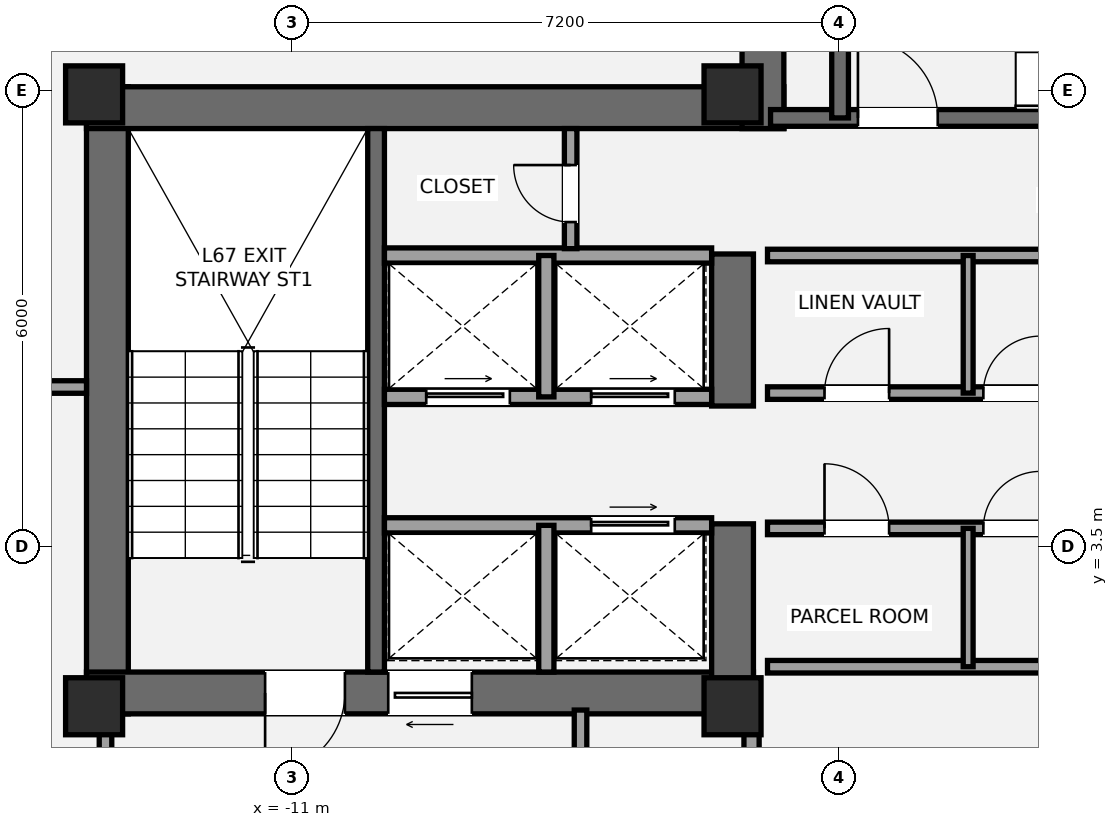
"""IFC4 building model, lengths in metres.
Left out: names, types, materials, properties, quantities, classifications, styles, units other than length and angle.
Written with IfcOpenShell. Run it as: python <this file> out.ifc"""

import sys

from ifc_helpers import new_model, si_unit, direction, frame, frame_2d, origin, origin_2d, place, context, subcontext, project, spatial, rectangle, extrude, element, fill, save


model = new_model("IFC4")
c1 = context("Model", 3, precision=1e-05, world=origin(), true_north=direction((0.0, 1.0)))
c2 = subcontext(c1, "Body", "Model", "MODEL_VIEW")
j1 = project(units=[si_unit("LENGTHUNIT", "METRE"), si_unit("PLANEANGLEUNIT", "RADIAN")], contexts=[c1])
p1 = place(None, origin())
s1 = spatial("IfcSite", under=j1, at=p1, CompositionType="ELEMENT")
p2 = place(p1, origin())
s2 = spatial("IfcBuilding", under=s1, at=p2, CompositionType="ELEMENT")
p3 = place(p2, frame((0.0, 0.0, 238.35)))
s3 = spatial("IfcBuildingStorey", under=s2, at=p3, CompositionType="ELEMENT", Elevation=238.35)
p4 = place(p3, frame((-13.425, 1.3, 0.0), z_axis=(0.0, 0.0, 1.0), x_axis=(0.0, 1.0, 0.0)))
e1 = element("IfcWall", 1, at=p4, inside=s3, PredefinedType="SHEAR", context=c2, shape_type="SweptSolid", body=[
    extrude(rectangle(XDim=8.25, YDim=0.55, at=frame_2d((4.125, 0.0))), origin(), (0.0, 0.0, 1.0), 3.15),
])
p5 = place(p3, frame((-13.7, 9.275, 0.0), z_axis=(0.0, 0.0, 1.0), x_axis=(1.0, 0.0, 0.0)))
e2 = element("IfcWall", 2, at=p5, inside=s3, PredefinedType="SHEAR", context=c2, shape_type="SweptSolid", body=[
    extrude(rectangle(XDim=9.175, YDim=0.55, at=frame_2d((4.587, 0.0))), origin(), (0.0, 0.0, 1.0), 3.15),
])
p6 = place(p3, frame((-4.925, 1.575, 0.0), z_axis=(0.0, 0.0, 1.0), x_axis=(-1.0, 0.0, 0.0)))
e3 = element("IfcWall", 3, at=p6, inside=s3, PredefinedType="SHEAR", context=c2, shape_type="SweptSolid", body=[
    extrude(rectangle(XDim=8.775, YDim=0.55, at=frame_2d((4.387, 0.0))), origin(), (0.0, 0.0, 1.0), 3.15),
])
p7 = place(p6, frame((5.375, 0.0, 0.0)))
e4 = element("IfcOpeningElement", 4, at=p7, cuts=e3, PredefinedType="OPENING", context=c2, shape_type="SweptSolid", body=[
    extrude(rectangle(XDim=1.05, YDim=2.15, at=frame_2d((0.525, 1.075))), frame((0.0, 0.285, 0.0), z_axis=(0.0, -1.0, 0.0), x_axis=(1.0, 0.0, 0.0)), (0.0, 0.0, 1.0), 0.57),
])
p8 = place(p6, frame((3.705, 0.0, 0.0)))
e5 = element("IfcOpeningElement", 5, at=p8, cuts=e3, PredefinedType="OPENING", context=c2, shape_type="SweptSolid", body=[
    extrude(rectangle(XDim=1.1, YDim=2.2, at=frame_2d((0.55, 1.1))), frame((0.0, 0.285, 0.0), z_axis=(0.0, -1.0, 0.0), x_axis=(1.0, 0.0, 0.0)), (0.0, 0.0, 1.0), 0.57),
])
p9 = place(p3, frame((-5.2, 1.3, 0.0), z_axis=(0.0, 0.0, 1.0), x_axis=(0.0, 1.0, 0.0)))
e6 = element("IfcWall", 6, at=p9, inside=s3, PredefinedType="SHEAR", context=c2, shape_type="SweptSolid", body=[
    extrude(rectangle(XDim=2.5, YDim=0.55, at=frame_2d((1.25, 0.0))), origin(), (0.0, 0.0, 1.0), 3.15),
])
p10 = place(p3, frame((-5.2, 5.35, 0.0), z_axis=(0.0, 0.0, 1.0), x_axis=(0.0, 1.0, 0.0)))
e7 = element("IfcWall", 7, at=p10, inside=s3, PredefinedType="SHEAR", context=c2, shape_type="SweptSolid", body=[
    extrude(rectangle(XDim=2.0, YDim=0.55, at=frame_2d((1.0, 0.0))), origin(), (0.0, 0.0, 1.0), 3.15),
])
p11 = place(p3, frame((-9.89, 1.85, 0.0), z_axis=(0.0, 0.0, 1.0), x_axis=(0.0, 1.0, 0.0)))
e8 = element("IfcWall", 8, at=p11, inside=s3, PredefinedType="SHEAR", context=c2, shape_type="SweptSolid", body=[
    extrude(rectangle(XDim=7.15, YDim=0.22, at=frame_2d((3.575, 0.0))), origin(), (0.0, 0.0, 1.0), 3.15),
])
p12 = place(p3, frame((-4.8, 9.0, 0.0), z_axis=(0.0, 0.0, 1.0), x_axis=(0.0, 1.0, 0.0)))
e9 = element("IfcWall", 9, at=p12, inside=s3, PredefinedType="SHEAR", context=c2, shape_type="SweptSolid", body=[
    extrude(rectangle(XDim=3.95, YDim=0.55, at=frame_2d((1.975, 0.0))), origin(), (0.0, 0.0, 1.0), 3.15),
])
p13 = place(p3, frame((-4.7, 9.14, 0.0), z_axis=(0.0, 0.0, 1.0), x_axis=(1.0, 0.0, 0.0)))
e10 = element("IfcWall", 10, at=p13, inside=s3, PredefinedType="SHEAR", context=c2, shape_type="SweptSolid", body=[
    extrude(rectangle(XDim=9.3, YDim=0.22, at=frame_2d((4.65, 0.0))), origin(), (0.0, 0.0, 1.0), 3.15),
])
p14 = place(p13, frame((1.15, 0.0, 0.0)))
e11 = element("IfcOpeningElement", 11, at=p14, cuts=e10, PredefinedType="OPENING", context=c2, shape_type="SweptSolid", body=[
    extrude(rectangle(XDim=1.05, YDim=2.15, at=frame_2d((0.525, 1.075))), frame((0.0, 0.12, 0.0), z_axis=(0.0, -1.0, 0.0), x_axis=(1.0, 0.0, 0.0)), (0.0, 0.0, 1.0), 0.24),
])
p15 = place(p3, frame((-3.785, 9.14, 0.0), z_axis=(0.0, 0.0, 1.0), x_axis=(0.0, 1.0, 0.0)))
e12 = element("IfcWall", 12, at=p15, inside=s3, PredefinedType="SHEAR", context=c2, shape_type="SweptSolid", body=[
    extrude(rectangle(XDim=3.26, YDim=0.22, at=frame_2d((1.63, 0.0))), origin(), (0.0, 0.0, 1.0), 3.15),
])
for number, where, z_axis, x_axis in (
    (13, (-13.6, 1.4, 0.0), (0.0, 0.0, 1.0), (1.0, 0.0, 0.0)),
    (14, (-13.6, 9.45, 0.0), (0.0, 0.0, 1.0), (1.0, 0.0, 0.0)),
    (15, (-5.2, 1.4, 0.0), (0.0, 0.0, 1.0), (1.0, 0.0, 0.0)),
    (16, (-5.2, 9.45, 0.0), (0.0, 0.0, 1.0), (1.0, 0.0, 0.0)),
):
    element("IfcColumn", number, at=place(p3, frame(where, z_axis=z_axis, x_axis=x_axis)), inside=s3, PredefinedType="PILASTER", context=c2, shape_type="SweptSolid", body=[
        extrude(rectangle(XDim=0.75, YDim=0.75, at=origin_2d()), origin(), (0.0, 0.0, 1.0), 3.15),
    ])
p16 = place(p3, frame((-17.381, 9.559, 0.0), z_axis=(0.0, 0.0, 1.0), x_axis=(0.827637036896, 0.561263694851, 0.0)))
e17 = element("IfcWall", 17, at=p16, inside=s3, PredefinedType="STANDARD", context=c2, shape_type="SweptSolid", body=[
    extrude(rectangle(XDim=3.793, YDim=0.44, at=frame_2d((1.896, 0.0))), origin(), (0.0, 0.0, 1.0), 2.336),
])
p17 = place(p16, frame((2.693, 0.0, 0.58)))
e18 = element("IfcOpeningElement", 18, at=p17, cuts=e17, PredefinedType="OPENING", context=c2, shape_type="SweptSolid", body=[
    extrude(rectangle(XDim=0.9, YDim=1.35, at=frame_2d((0.45, 0.675))), frame((0.0, 0.23, 0.0), z_axis=(0.0, -1.0, 0.0), x_axis=(1.0, 0.0, 0.0)), (0.0, 0.0, 1.0), 0.46),
])
p18 = place(p3, frame((-13.45, -2.15, 0.0), z_axis=(0.0, 0.0, 1.0), x_axis=(0.0, 1.0, 0.0)))
e19 = element("IfcWall", 19, at=p18, inside=s3, PredefinedType="PARTITIONING", context=c2, shape_type="SweptSolid", body=[
    extrude(rectangle(XDim=3.5, YDim=0.165, at=frame_2d((1.75, 0.0))), origin(), (0.0, 0.0, 1.0), 2.423),
])
p19 = place(p18, frame((0.67, 0.0, 0.0)))
e20 = element("IfcOpeningElement", 20, at=p19, cuts=e19, PredefinedType="OPENING", context=c2, shape_type="SweptSolid", body=[
    extrude(rectangle(XDim=1.05, YDim=2.15, at=frame_2d((0.525, 1.075))), frame((0.0, 0.093, 0.0), z_axis=(0.0, -1.0, 0.0), x_axis=(1.0, 0.0, 0.0)), (0.0, 0.0, 1.0), 0.185),
])
p20 = place(p3, frame((-7.2, -2.15, 0.0), z_axis=(0.0, 0.0, 1.0), x_axis=(0.0, 1.0, 0.0)))
e21 = element("IfcWall", 21, at=p20, inside=s3, PredefinedType="PARTITIONING", context=c2, shape_type="SweptSolid", body=[
    extrude(rectangle(XDim=3.5, YDim=0.165, at=frame_2d((1.75, 0.0))), origin(), (0.0, 0.0, 1.0), 2.423),
])
p21 = place(p3, frame((-4.95, -2.15, 0.0), z_axis=(0.0, 0.0, 1.0), x_axis=(0.0, 1.0, 0.0)))
e22 = element("IfcWall", 22, at=p21, inside=s3, PredefinedType="SOLIDWALL", context=c2, shape_type="SweptSolid", body=[
    extrude(rectangle(XDim=3.5, YDim=0.2, at=frame_2d((1.75, 0.0))), origin(), (0.0, 0.0, 1.0), 2.423),
])
p22 = place(p21, frame((0.95, 0.0, 0.0)))
e23 = element("IfcOpeningElement", 23, at=p22, cuts=e22, PredefinedType="OPENING", context=c2, shape_type="SweptSolid", body=[
    extrude(rectangle(XDim=0.75, YDim=2.1, at=frame_2d((0.375, 1.05))), frame((0.0, 0.11, 0.0), z_axis=(0.0, -1.0, 0.0), x_axis=(1.0, 0.0, 0.0)), (0.0, 0.0, 1.0), 0.22),
])
p23 = place(p3, frame((-9.78, 3.78, 0.0), z_axis=(0.0, 0.0, 1.0), x_axis=(1.0, 0.0, 0.0)))
e24 = element("IfcWall", 24, at=p23, inside=s3, PredefinedType="SOLIDWALL", context=c2, shape_type="SweptSolid", body=[
    extrude(rectangle(XDim=4.305, YDim=0.2, at=frame_2d((2.152, 0.0))), origin(), (0.0, 0.0, 1.0), 2.97),
])
p24 = place(p23, frame((2.72, 0.0, 0.0)))
e25 = element("IfcOpeningElement", 25, at=p24, cuts=e24, PredefinedType="OPENING", context=c2, shape_type="SweptSolid", body=[
    extrude(rectangle(XDim=1.1, YDim=2.2, at=frame_2d((0.55, 1.1))), frame((0.0, 0.11, 0.0), z_axis=(0.0, -1.0, 0.0), x_axis=(1.0, 0.0, 0.0)), (0.0, 0.0, 1.0), 0.22),
])
p25 = place(p3, frame((-7.65, 1.85, 0.0), z_axis=(0.0, 0.0, 1.0), x_axis=(0.0, 1.0, 0.0)))
e26 = element("IfcWall", 26, at=p25, inside=s3, PredefinedType="SOLIDWALL", context=c2, shape_type="SweptSolid", body=[
    extrude(rectangle(XDim=1.93, YDim=0.2, at=frame_2d((0.965, 0.0))), origin(), (0.0, 0.0, 1.0), 2.97),
])
p26 = place(p3, frame((-9.78, 5.47, 0.0), z_axis=(0.0, 0.0, 1.0), x_axis=(1.0, 0.0, 0.0)))
e27 = element("IfcWall", 27, at=p26, inside=s3, PredefinedType="SOLIDWALL", context=c2, shape_type="SweptSolid", body=[
    extrude(rectangle(XDim=4.305, YDim=0.2, at=frame_2d((2.152, 0.0))), origin(), (0.0, 0.0, 1.0), 2.97),
])
p27 = place(p26, frame((0.55, 0.0, 0.0)))
e28 = element("IfcOpeningElement", 28, at=p27, cuts=e27, PredefinedType="OPENING", context=c2, shape_type="SweptSolid", body=[
    extrude(rectangle(XDim=1.1, YDim=2.2, at=frame_2d((0.55, 1.1))), frame((0.0, 0.11, 0.0), z_axis=(0.0, -1.0, 0.0), x_axis=(1.0, 0.0, 0.0)), (0.0, 0.0, 1.0), 0.22),
])
p28 = place(p26, frame((2.72, 0.0, 0.0)))
e29 = element("IfcOpeningElement", 29, at=p28, cuts=e27, PredefinedType="OPENING", context=c2, shape_type="SweptSolid", body=[
    extrude(rectangle(XDim=1.1, YDim=2.2, at=frame_2d((0.55, 1.1))), frame((0.0, 0.11, 0.0), z_axis=(0.0, -1.0, 0.0), x_axis=(1.0, 0.0, 0.0)), (0.0, 0.0, 1.0), 0.22),
])
p29 = place(p3, frame((-9.78, 7.33, 0.0), z_axis=(0.0, 0.0, 1.0), x_axis=(1.0, 0.0, 0.0)))
e30 = element("IfcWall", 30, at=p29, inside=s3, PredefinedType="SOLIDWALL", context=c2, shape_type="SweptSolid", body=[
    extrude(rectangle(XDim=4.305, YDim=0.2, at=frame_2d((2.152, 0.0))), origin(), (0.0, 0.0, 1.0), 2.97),
])
p30 = place(p3, frame((-7.65, 5.47, 0.0), z_axis=(0.0, 0.0, 1.0), x_axis=(0.0, 1.0, 0.0)))
e31 = element("IfcWall", 31, at=p30, inside=s3, PredefinedType="SOLIDWALL", context=c2, shape_type="SweptSolid", body=[
    extrude(rectangle(XDim=1.86, YDim=0.2, at=frame_2d((0.93, 0.0))), origin(), (0.0, 0.0, 1.0), 2.97),
])
p31 = place(p3, frame((-4.74, 1.92, 0.0), z_axis=(0.0, 0.0, 1.0), x_axis=(1.0, 0.0, 0.0)))
e32 = element("IfcWall", 32, at=p31, inside=s3, PredefinedType="PARTITIONING", context=c2, shape_type="SweptSolid", body=[
    extrude(rectangle(XDim=3.89, YDim=0.165, at=frame_2d((1.945, 0.0))), origin(), (0.0, 0.0, 1.0), 2.11),
])
p32 = place(p3, frame((-4.74, 3.74, 0.0), z_axis=(0.0, 0.0, 1.0), x_axis=(1.0, 0.0, 0.0)))
e33 = element("IfcWall", 33, at=p32, inside=s3, PredefinedType="PARTITIONING", context=c2, shape_type="SweptSolid", body=[
    extrude(rectangle(XDim=3.89, YDim=0.165, at=frame_2d((1.945, 0.0))), origin(), (0.0, 0.0, 1.0), 2.97),
])
p33 = place(p32, frame((0.75, 0.0, 0.0)))
e34 = element("IfcOpeningElement", 34, at=p33, cuts=e33, PredefinedType="OPENING", context=c2, shape_type="SweptSolid", body=[
    extrude(rectangle(XDim=0.85, YDim=2.1, at=frame_2d((0.425, 1.05))), frame((0.0, 0.093, 0.0), z_axis=(0.0, -1.0, 0.0), x_axis=(1.0, 0.0, 0.0)), (0.0, 0.0, 1.0), 0.185),
])
p34 = place(p32, frame((2.84, 0.0, 0.0)))
e35 = element("IfcOpeningElement", 35, at=p34, cuts=e33, PredefinedType="OPENING", context=c2, shape_type="SweptSolid", body=[
    extrude(rectangle(XDim=0.75, YDim=2.1, at=frame_2d((0.375, 1.05))), frame((0.0, 0.093, 0.0), z_axis=(0.0, -1.0, 0.0), x_axis=(1.0, 0.0, 0.0)), (0.0, 0.0, 1.0), 0.185),
])
p35 = place(p3, frame((-2.1, 1.92, 0.0), z_axis=(0.0, 0.0, 1.0), x_axis=(0.0, 1.0, 0.0)))
e36 = element("IfcWall", 36, at=p35, inside=s3, PredefinedType="PARTITIONING", context=c2, shape_type="SweptSolid", body=[
    extrude(rectangle(XDim=1.82, YDim=0.13, at=frame_2d((0.91, 0.0))), origin(), (0.0, 0.0, 1.0), 2.97),
])
p36 = place(p3, frame((-4.74, 5.52, 0.0), z_axis=(0.0, 0.0, 1.0), x_axis=(1.0, 0.0, 0.0)))
e37 = element("IfcWall", 37, at=p36, inside=s3, PredefinedType="PARTITIONING", context=c2, shape_type="SweptSolid", body=[
    extrude(rectangle(XDim=3.89, YDim=0.165, at=frame_2d((1.945, 0.0))), origin(), (0.0, 0.0, 1.0), 2.97),
])
p37 = place(p36, frame((0.75, 0.0, 0.0)))
e38 = element("IfcOpeningElement", 38, at=p37, cuts=e37, PredefinedType="OPENING", context=c2, shape_type="SweptSolid", body=[
    extrude(rectangle(XDim=0.85, YDim=2.1, at=frame_2d((0.425, 1.05))), frame((0.0, 0.093, 0.0), z_axis=(0.0, -1.0, 0.0), x_axis=(1.0, 0.0, 0.0)), (0.0, 0.0, 1.0), 0.185),
])
p38 = place(p36, frame((2.84, 0.0, 0.0)))
e39 = element("IfcOpeningElement", 39, at=p38, cuts=e37, PredefinedType="OPENING", context=c2, shape_type="SweptSolid", body=[
    extrude(rectangle(XDim=0.75, YDim=2.1, at=frame_2d((0.375, 1.05))), frame((0.0, 0.093, 0.0), z_axis=(0.0, -1.0, 0.0), x_axis=(1.0, 0.0, 0.0)), (0.0, 0.0, 1.0), 0.185),
])
p39 = place(p3, frame((-4.74, 7.33, 0.0), z_axis=(0.0, 0.0, 1.0), x_axis=(1.0, 0.0, 0.0)))
e40 = element("IfcWall", 40, at=p39, inside=s3, PredefinedType="PARTITIONING", context=c2, shape_type="SweptSolid", body=[
    extrude(rectangle(XDim=3.89, YDim=0.165, at=frame_2d((1.945, 0.0))), origin(), (0.0, 0.0, 1.0), 2.97),
])
p40 = place(p3, frame((-2.1, 5.52, 0.0), z_axis=(0.0, 0.0, 1.0), x_axis=(0.0, 1.0, 0.0)))
e41 = element("IfcWall", 41, at=p40, inside=s3, PredefinedType="PARTITIONING", context=c2, shape_type="SweptSolid", body=[
    extrude(rectangle(XDim=1.81, YDim=0.13, at=frame_2d((0.905, 0.0))), origin(), (0.0, 0.0, 1.0), 2.97),
])
p41 = place(p3, frame((-7.33, 7.42, 0.0), z_axis=(0.0, 0.0, 1.0), x_axis=(0.0, 1.0, 0.0)))
e42 = element("IfcWall", 42, at=p41, inside=s3, PredefinedType="PARTITIONING", context=c2, shape_type="SweptSolid", body=[
    extrude(rectangle(XDim=1.58, YDim=0.165, at=frame_2d((0.79, 0.0))), origin(), (0.0, 0.0, 1.0), 2.97),
])
p42 = place(p41, frame((0.35, 0.0, 0.0)))
e43 = element("IfcOpeningElement", 43, at=p42, cuts=e42, PredefinedType="OPENING", context=c2, shape_type="SweptSolid", body=[
    extrude(rectangle(XDim=0.75, YDim=2.1, at=frame_2d((0.375, 1.05))), frame((0.0, 0.093, 0.0), z_axis=(0.0, -1.0, 0.0), x_axis=(1.0, 0.0, 0.0)), (0.0, 0.0, 1.0), 0.185),
])
p43 = place(p3, frame((-20.06, 5.6, 0.0), z_axis=(0.0, 0.0, 1.0), x_axis=(1.0, 0.0, 0.0)))
e44 = element("IfcWall", 44, at=p43, inside=s3, PredefinedType="PARTITIONING", context=c2, shape_type="SweptSolid", body=[
    extrude(rectangle(XDim=6.36, YDim=0.165, at=frame_2d((3.18, 0.0))), origin(), (0.0, 0.0, 1.0), 2.423),
])
p44 = place(p43, frame((2.259, 0.0, 0.0)))
e45 = element("IfcOpeningElement", 45, at=p44, cuts=e44, PredefinedType="OPENING", context=c2, shape_type="SweptSolid", body=[
    extrude(rectangle(XDim=0.9, YDim=2.1, at=frame_2d((0.45, 1.05))), frame((0.0, 0.093, 0.0), z_axis=(0.0, -1.0, 0.0), x_axis=(1.0, 0.0, 0.0)), (0.0, 0.0, 1.0), 0.185),
])
p45 = place(p7, origin())
e46 = element("IfcDoor", 46, at=p45, inside=s3, OperationType="SINGLE_SWING_RIGHT", PredefinedType="DOOR", context=c2, shape_type="SweptSolid", body=[
    extrude(rectangle(XDim=1.05, YDim=2.15, at=frame_2d((0.525, 1.075))), frame((0.0, 0.025, 0.0), z_axis=(0.0, -1.0, 0.0), x_axis=(1.0, 0.0, 0.0)), (0.0, 0.0, 1.0), 0.05),
])
fill(e4, e46)
p46 = place(p14, origin())
e47 = element("IfcDoor", 47, at=p46, inside=s3, OperationType="SINGLE_SWING_LEFT", PredefinedType="DOOR", context=c2, shape_type="SweptSolid", body=[
    extrude(rectangle(XDim=1.05, YDim=2.15, at=frame_2d((0.525, 1.075))), frame((0.0, 0.025, 0.0), z_axis=(0.0, -1.0, 0.0), x_axis=(1.0, 0.0, 0.0)), (0.0, 0.0, 1.0), 0.05),
])
fill(e11, e47)
p47 = place(p8, origin())
e48 = element("IfcDoor", 48, at=p47, inside=s3, OperationType="SLIDING_TO_LEFT", PredefinedType="DOOR", context=c2, shape_type="SweptSolid", body=[
    extrude(rectangle(XDim=1.1, YDim=2.2, at=frame_2d((0.55, 1.1))), frame((0.0, 0.025, 0.0), z_axis=(0.0, -1.0, 0.0), x_axis=(1.0, 0.0, 0.0)), (0.0, 0.0, 1.0), 0.05),
])
fill(e5, e48)
p48 = place(p27, origin())
e49 = element("IfcDoor", 49, at=p48, inside=s3, OperationType="SLIDING_TO_LEFT", PredefinedType="DOOR", context=c2, shape_type="SweptSolid", body=[
    extrude(rectangle(XDim=1.1, YDim=2.2, at=frame_2d((0.55, 1.1))), frame((0.0, 0.025, 0.0), z_axis=(0.0, -1.0, 0.0), x_axis=(1.0, 0.0, 0.0)), (0.0, 0.0, 1.0), 0.05),
])
fill(e28, e49)
p49 = place(p28, origin())
e50 = element("IfcDoor", 50, at=p49, inside=s3, OperationType="SLIDING_TO_LEFT", PredefinedType="DOOR", context=c2, shape_type="SweptSolid", body=[
    extrude(rectangle(XDim=1.1, YDim=2.2, at=frame_2d((0.55, 1.1))), frame((0.0, 0.025, 0.0), z_axis=(0.0, -1.0, 0.0), x_axis=(1.0, 0.0, 0.0)), (0.0, 0.0, 1.0), 0.05),
])
fill(e29, e50)
p50 = place(p24, origin())
e51 = element("IfcDoor", 51, at=p50, inside=s3, OperationType="SLIDING_TO_LEFT", PredefinedType="DOOR", context=c2, shape_type="SweptSolid", body=[
    extrude(rectangle(XDim=1.1, YDim=2.2, at=frame_2d((0.55, 1.1))), frame((0.0, 0.025, 0.0), z_axis=(0.0, -1.0, 0.0), x_axis=(1.0, 0.0, 0.0)), (0.0, 0.0, 1.0), 0.05),
])
fill(e25, e51)
p51 = place(p33, origin())
e52 = element("IfcDoor", 52, at=p51, inside=s3, OperationType="SINGLE_SWING_LEFT", PredefinedType="DOOR", context=c2, shape_type="SweptSolid", body=[
    extrude(rectangle(XDim=0.85, YDim=2.1, at=frame_2d((0.425, 1.05))), frame((0.0, 0.025, 0.0), z_axis=(0.0, -1.0, 0.0), x_axis=(1.0, 0.0, 0.0)), (0.0, 0.0, 1.0), 0.05),
])
fill(e34, e52)
p52 = place(p34, origin())
e53 = element("IfcDoor", 53, at=p52, inside=s3, OperationType="SINGLE_SWING_RIGHT", PredefinedType="DOOR", context=c2, shape_type="SweptSolid", body=[
    extrude(rectangle(XDim=0.75, YDim=2.1, at=frame_2d((0.375, 1.05))), frame((0.0, 0.025, 0.0), z_axis=(0.0, -1.0, 0.0), x_axis=(1.0, 0.0, 0.0)), (0.0, 0.0, 1.0), 0.05),
])
fill(e35, e53)
p53 = place(p37, origin())
e54 = element("IfcDoor", 54, at=p53, inside=s3, OperationType="SINGLE_SWING_RIGHT", PredefinedType="DOOR", context=c2, shape_type="SweptSolid", body=[
    extrude(rectangle(XDim=0.85, YDim=2.1, at=frame_2d((0.425, 1.05))), frame((0.0, 0.025, 0.0), z_axis=(0.0, -1.0, 0.0), x_axis=(1.0, 0.0, 0.0)), (0.0, 0.0, 1.0), 0.05),
])
fill(e38, e54)
p54 = place(p38, origin())
e55 = element("IfcDoor", 55, at=p54, inside=s3, OperationType="SINGLE_SWING_RIGHT", PredefinedType="DOOR", context=c2, shape_type="SweptSolid", body=[
    extrude(rectangle(XDim=0.75, YDim=2.1, at=frame_2d((0.375, 1.05))), frame((0.0, 0.025, 0.0), z_axis=(0.0, -1.0, 0.0), x_axis=(1.0, 0.0, 0.0)), (0.0, 0.0, 1.0), 0.05),
])
fill(e39, e55)
p55 = place(p42, origin())
e56 = element("IfcDoor", 56, at=p55, inside=s3, OperationType="SINGLE_SWING_RIGHT", PredefinedType="DOOR", context=c2, shape_type="SweptSolid", body=[
    extrude(rectangle(XDim=0.75, YDim=2.1, at=frame_2d((0.375, 1.05))), frame((0.0, 0.025, 0.0), z_axis=(0.0, -1.0, 0.0), x_axis=(1.0, 0.0, 0.0)), (0.0, 0.0, 1.0), 0.05),
])
fill(e43, e56)
save(model, sys.argv[1])
